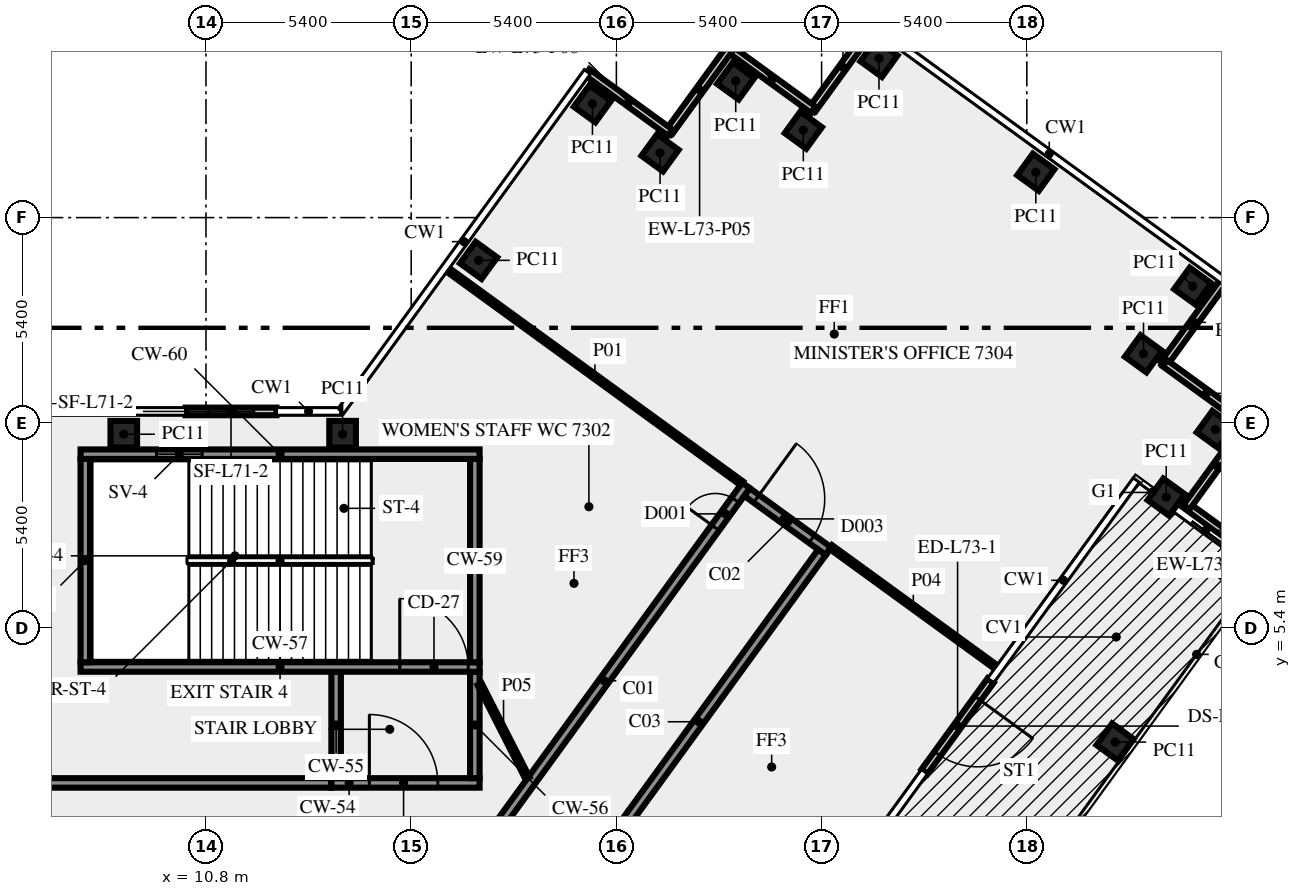
"""IFC4 building model, lengths in metres.
Left out: names, types, materials, properties, quantities, classifications, styles, units other than length and angle.
Written with IfcOpenShell. Run it as: python <this file> out.ifc"""

import sys

from ifc_helpers import new_model, si_unit, direction, frame, frame_2d, origin, origin_2d, place, context, subcontext, project, spatial, rectangle, extrude, element, fill, save


model = new_model("IFC4")
c1 = context("Model", 3, precision=1e-05, world=origin(), true_north=direction((0.0, 1.0)))
c2 = subcontext(c1, "Body", "Model", "MODEL_VIEW")
j1 = project(units=[si_unit("LENGTHUNIT", "METRE"), si_unit("PLANEANGLEUNIT", "RADIAN")], contexts=[c1])
p1 = place(None, origin())
s1 = spatial("IfcSite", under=j1, at=p1, CompositionType="ELEMENT")
p2 = place(p1, origin())
s2 = spatial("IfcBuilding", under=s1, at=p2, CompositionType="ELEMENT")
p3 = place(p2, frame((0.0, 0.0, 315.0)))
s3 = spatial("IfcBuildingStorey", under=s2, at=p3, CompositionType="ELEMENT", Elevation=315.0)
for number, where, z_axis, x_axis in (
    (1, (34.722, 2.4, 0.0), (0.0, 0.0, 1.0), (0.588, 0.809, 0.0)),
    (2, (37.96, 6.855, 0.0), (0.0, 0.0, 1.0), (0.588, 0.809, 0.0)),
    (3, (36.068, 8.844, 0.0), (0.0, 0.0, 1.0), (0.588, 0.809, 0.0)),
    (4, (37.36, 10.625, 0.0), (0.0, 0.0, 1.0), (0.588, 0.809, 0.0)),
    (5, (35.471, 12.616, 0.0), (0.0, 0.0, 1.0), (-0.809, 0.588, 0.0)),
    (6, (36.765, 14.395, 0.0), (0.0, 0.0, 1.0), (-0.809, 0.588, 0.0)),
    (7, (32.637, 17.393, 0.0), (0.0, 0.0, 1.0), (-0.809, 0.588, 0.0)),
    (8, (28.51, 20.39, 0.0), (0.0, 0.0, 1.0), (-0.588, -0.809, 0.0)),
    (9, (26.519, 18.5, 0.0), (0.0, 0.0, 1.0), (-0.809, 0.588, 0.0)),
    (10, (24.74, 19.795, 0.0), (0.0, 0.0, 1.0), (-0.588, -0.809, 0.0)),
    (11, (22.749, 17.904, 0.0), (0.0, 0.0, 1.0), (-0.588, -0.809, 0.0)),
    (12, (20.97, 19.195, 0.0), (0.0, 0.0, 1.0), (-0.588, -0.809, 0.0)),
    (13, (17.974, 15.075, 0.0), (0.0, 0.0, 1.0), (-0.588, -0.809, 0.0)),
    (14, (14.395, 10.5, 0.0), (0.0, 0.0, 1.0), (-1.0, 0.0, 0.0)),
    (15, (8.637, 10.5, 0.0), (0.0, 0.0, 1.0), (-1.0, 0.0, 0.0)),
):
    element("IfcColumn", number, at=place(p3, frame(where, z_axis=z_axis, x_axis=x_axis)), inside=s3, PredefinedType="COLUMN", context=c2, shape_type="SweptSolid", body=[
        extrude(rectangle(XDim=0.7, YDim=0.7, at=origin_2d()), origin(), (0.0, 0.0, 1.0), 3.65),
    ])
p4 = place(p3, frame((36.005, 12.352, 0.0), z_axis=(0.0, 0.0, 1.0), x_axis=(0.587762999008, 0.809033161865, 0.0)))
e16 = element("IfcWall", 16, at=p4, inside=s3, PredefinedType="SOLIDWALL", context=c2, shape_type="SweptSolid", body=[
    extrude(rectangle(XDim=2.7, YDim=0.2, at=frame_2d((1.35, 0.0))), origin(), (0.0, 0.0, 1.0), 3.65),
])
for number, where, z_axis, x_axis in (
    (17, (28.354, 21.247, 0.0), (0.0, 0.0, 1.0), (-0.588, -0.809, 0.0)),
    (18, (26.785, 19.036, 0.0), (0.0, 0.0, 1.0), (-0.809, 0.588, 0.0)),
):
    element("IfcWall", number, at=place(p3, frame(where, z_axis=z_axis, x_axis=x_axis)), inside=s3, PredefinedType="SOLIDWALL", context=c2, shape_type="SweptSolid", body=[
        extrude(rectangle(XDim=2.7, YDim=0.2, at=frame_2d((1.35, 0.0))), origin(), (0.0, 0.0, 1.0), 3.65),
    ])
for number, where, z_axis, x_axis in (
    (19, (24.583, 20.65, 0.0), (0.0, 0.0, 1.0), (-0.588, -0.809, 0.0)),
    (20, (23.013, 18.438, 0.0), (0.0, 0.0, 1.0), (-0.809, 0.588, 0.0)),
):
    element("IfcWall", number, at=place(p3, frame(where, z_axis=z_axis, x_axis=x_axis)), inside=s3, PredefinedType="SOLIDWALL", context=c2, shape_type="SweptSolid", body=[
        extrude(rectangle(XDim=2.7, YDim=0.2, at=frame_2d((1.35, 0.0))), origin(), (0.0, 0.0, 1.0), 3.65),
    ])
p5 = place(p3, frame((12.655, 11.1, 0.0), z_axis=(0.0, 0.0, 1.0), x_axis=(-1.0, 0.0, 0.0)))
e21 = element("IfcWall", 21, at=p5, inside=s3, PredefinedType="SOLIDWALL", context=c2, shape_type="SweptSolid", body=[
    extrude(rectangle(XDim=2.392, YDim=0.2, at=frame_2d((1.196, 0.0))), origin(), (0.0, 0.0, 1.0), 3.65),
])
p6 = place(p5, frame((0.596, 0.0, 1.0)))
e22 = element("IfcOpeningElement", 22, at=p6, cuts=e21, PredefinedType="OPENING", context=c2, shape_type="SweptSolid", body=[
    extrude(rectangle(XDim=1.2, YDim=1.2, at=frame_2d((0.6, 0.6))), frame((0.0, 0.11, 0.0), z_axis=(0.0, -1.0, 0.0), x_axis=(1.0, 0.0, 0.0)), (0.0, 0.0, 1.0), 0.22),
])
p7 = place(p3, frame((31.449, 4.019, 0.0), z_axis=(0.0, 0.0, 1.0), x_axis=(-0.58782869016, -0.808985433135, 0.0)))
e23 = element("IfcWall", 23, at=p7, inside=s3, PredefinedType="SOLIDWALL", context=c2, shape_type="SweptSolid", body=[
    extrude(rectangle(XDim=2.963, YDim=0.2, at=frame_2d((1.481, 0.0))), origin(), (0.0, 0.0, 1.0), 3.65),
])
p8 = place(p7, frame((0.582, 0.0, 0.0)))
e24 = element("IfcOpeningElement", 24, at=p8, cuts=e23, PredefinedType="OPENING", context=c2, shape_type="SweptSolid", body=[
    extrude(rectangle(XDim=1.8, YDim=2.4, at=frame_2d((0.9, 1.2))), frame((0.0, 0.11, 0.0), z_axis=(0.0, -1.0, 0.0), x_axis=(1.0, 0.0, 0.0)), (0.0, 0.0, 1.0), 0.22),
])
p9 = place(p3, frame((38.733, 7.069, 0.0), z_axis=(0.0, 0.0, 1.0), x_axis=(-0.80901210161, 0.587791986546, 0.0)))
e25 = element("IfcWall", 25, at=p9, inside=s3, PredefinedType="SOLIDWALL", context=c2, shape_type="SweptSolid", body=[
    extrude(rectangle(XDim=2.6, YDim=0.2, at=frame_2d((1.3, 0.0))), origin(), (0.0, 0.0, 1.0), 3.65),
])
for number, where, z_axis, x_axis in (
    (26, (36.602, 8.58, 0.0), (0.0, 0.0, 1.0), (0.588, 0.809, 0.0)),
    (27, (38.216, 10.782, 0.0), (0.0, 0.0, 1.0), (-0.809, 0.588, 0.0)),
):
    element("IfcWall", number, at=place(p3, frame(where, z_axis=z_axis, x_axis=x_axis)), inside=s3, PredefinedType="SOLIDWALL", context=c2, shape_type="SweptSolid", body=[
        extrude(rectangle(XDim=2.7, YDim=0.2, at=frame_2d((1.35, 0.0))), origin(), (0.0, 0.0, 1.0), 3.65),
    ])
p10 = place(p3, frame((14.1, 1.325, 0.0), z_axis=(0.0, 0.0, 1.0), x_axis=(1.0, 0.0, 0.0)))
e28 = element("IfcWall", 28, at=p10, inside=s3, PredefinedType="SHEAR", context=c2, shape_type="SweptSolid", body=[
    extrude(rectangle(XDim=3.9, YDim=0.25, at=frame_2d((1.95, 0.0))), origin(), (0.0, 0.0, 1.0), 3.65),
])
p11 = place(p10, frame((1.0, 0.0, 0.0)))
e29 = element("IfcOpeningElement", 29, at=p11, cuts=e28, PredefinedType="OPENING", context=c2, shape_type="SweptSolid", body=[
    extrude(rectangle(XDim=1.8, YDim=2.1, at=frame_2d((0.9, 1.05))), frame((0.0, 0.135, 0.0), z_axis=(0.0, -1.0, 0.0), x_axis=(1.0, 0.0, 0.0)), (0.0, 0.0, 1.0), 0.27),
])
for number, where, z_axis, x_axis in (
    (30, (14.225, 1.45, 0.0), (0.0, 0.0, 1.0), (0.0, 1.0, 0.0)),
    (31, (17.875, 1.45, 0.0), (0.0, 0.0, 1.0), (0.0, 1.0, 0.0)),
):
    element("IfcWall", number, at=place(p3, frame(where, z_axis=z_axis, x_axis=x_axis)), inside=s3, PredefinedType="SHEAR", context=c2, shape_type="SweptSolid", body=[
        extrude(rectangle(XDim=2.8, YDim=0.25, at=frame_2d((1.4, 0.0))), origin(), (0.0, 0.0, 1.0), 3.65),
    ])
p12 = place(p3, frame((7.5, 4.375, 0.0), z_axis=(0.0, 0.0, 1.0), x_axis=(1.0, 0.0, 0.0)))
e32 = element("IfcWall", 32, at=p12, inside=s3, PredefinedType="SHEAR", context=c2, shape_type="SweptSolid", body=[
    extrude(rectangle(XDim=10.5, YDim=0.25, at=frame_2d((5.25, 0.0))), origin(), (0.0, 0.0, 1.0), 3.65),
])
p13 = place(p12, frame((8.4, 0.0, 0.0)))
e33 = element("IfcOpeningElement", 33, at=p13, cuts=e32, PredefinedType="OPENING", context=c2, shape_type="SweptSolid", body=[
    extrude(rectangle(XDim=1.8, YDim=2.1, at=frame_2d((0.9, 1.05))), frame((0.0, 0.135, 0.0), z_axis=(0.0, -1.0, 0.0), x_axis=(1.0, 0.0, 0.0)), (0.0, 0.0, 1.0), 0.27),
])
for number, where, z_axis, x_axis in (
    (34, (7.625, 4.5, 0.0), (0.0, 0.0, 1.0), (0.0, 1.0, 0.0)),
    (35, (17.875, 4.5, 0.0), (0.0, 0.0, 1.0), (0.0, 1.0, 0.0)),
):
    element("IfcWall", number, at=place(p3, frame(where, z_axis=z_axis, x_axis=x_axis)), inside=s3, PredefinedType="SHEAR", context=c2, shape_type="SweptSolid", body=[
        extrude(rectangle(XDim=5.35, YDim=0.25, at=frame_2d((2.675, 0.0))), origin(), (0.0, 0.0, 1.0), 3.65),
    ])
p14 = place(p3, frame((7.5, 9.975, 0.0), z_axis=(0.0, 0.0, 1.0), x_axis=(1.0, 0.0, 0.0)))
e36 = element("IfcWall", 36, at=p14, inside=s3, PredefinedType="SHEAR", context=c2, shape_type="SweptSolid", body=[
    extrude(rectangle(XDim=10.5, YDim=0.25, at=frame_2d((5.25, 0.0))), origin(), (0.0, 0.0, 1.0), 3.65),
])
p15 = place(p14, frame((2.0, 0.0, 1.0)))
e37 = element("IfcOpeningElement", 37, at=p15, cuts=e36, PredefinedType="OPENING", context=c2, shape_type="SweptSolid", body=[
    extrude(rectangle(XDim=1.2, YDim=1.2, at=frame_2d((0.6, 0.6))), frame((0.0, 0.135, 0.0), z_axis=(0.0, -1.0, 0.0), x_axis=(1.0, 0.0, 0.0)), (0.0, 0.0, 1.0), 0.27),
])
p16 = place(p3, frame((17.545, -1.125, 0.0), z_axis=(0.0, 0.0, 1.0), x_axis=(0.587796810203, 0.809008596935, 0.0)))
e38 = element("IfcWall", 38, at=p16, inside=s3, PredefinedType="SOLIDWALL", context=c2, shape_type="SweptSolid", body=[
    extrude(rectangle(XDim=12.703, YDim=0.25, at=frame_2d((6.352, 0.0))), origin(), (0.0, 0.0, 1.0), 3.65),
])
p17 = place(p16, frame((11.329, 0.0, 0.0)))
e39 = element("IfcOpeningElement", 39, at=p17, cuts=e38, PredefinedType="OPENING", context=c2, shape_type="SweptSolid", body=[
    extrude(rectangle(XDim=0.9, YDim=2.1, at=frame_2d((0.45, 1.05))), frame((0.0, 0.135, 0.0), z_axis=(0.0, -1.0, 0.0), x_axis=(1.0, 0.0, 0.0)), (0.0, 0.0, 1.0), 0.27),
])
p18 = place(p3, frame((25.039, 8.978, 0.0), z_axis=(0.0, 0.0, 1.0), x_axis=(0.809006914995, -0.587799125119, 0.0)))
e40 = element("IfcWall", 40, at=p18, inside=s3, PredefinedType="SOLIDWALL", context=c2, shape_type="SweptSolid", body=[
    extrude(rectangle(XDim=2.65, YDim=0.25, at=frame_2d((1.325, 0.0))), origin(), (0.0, 0.0, 1.0), 3.65),
])
p19 = place(p18, frame((0.301, 0.0, 0.0)))
e41 = element("IfcOpeningElement", 41, at=p19, cuts=e40, PredefinedType="OPENING", context=c2, shape_type="SweptSolid", body=[
    extrude(rectangle(XDim=1.8, YDim=2.1, at=frame_2d((0.9, 1.05))), frame((0.0, 0.135, 0.0), z_axis=(0.0, -1.0, 0.0), x_axis=(1.0, 0.0, 0.0)), (0.0, 0.0, 1.0), 0.27),
])
p20 = place(p3, frame((27.009, 7.392, 0.0), z_axis=(0.0, 0.0, 1.0), x_axis=(-0.587776457057, -0.809023384414, 0.0)))
e42 = element("IfcWall", 42, at=p20, inside=s3, PredefinedType="SOLIDWALL", context=c2, shape_type="SweptSolid", body=[
    extrude(rectangle(XDim=11.021, YDim=0.25, at=frame_2d((5.51, 0.0))), origin(), (0.0, 0.0, 1.0), 3.65),
])
p21 = place(p20, frame((9.588, 0.0, 0.0)))
e43 = element("IfcOpeningElement", 43, at=p21, cuts=e42, PredefinedType="OPENING", context=c2, shape_type="SweptSolid", body=[
    extrude(rectangle(XDim=0.9, YDim=2.1, at=frame_2d((0.45, 1.05))), frame((0.0, 0.135, 0.0), z_axis=(0.0, -1.0, 0.0), x_axis=(1.0, 0.0, 0.0)), (0.0, 0.0, 1.0), 0.27),
])
p22 = place(p3, frame((-5.246, 1.325, 0.0), z_axis=(0.0, 0.0, 1.0), x_axis=(1.0, 0.0, 0.0)))
e44 = element("IfcWall", 44, at=p22, inside=s3, PredefinedType="SOLIDWALL", context=c2, shape_type="SweptSolid", body=[
    extrude(rectangle(XDim=19.336, YDim=0.25, at=frame_2d((9.668, 0.0))), origin(), (0.0, 0.0, 1.0), 3.65),
])
p23 = place(p22, frame((8.771, 0.0, 0.0)))
e45 = element("IfcOpeningElement", 45, at=p23, cuts=e44, PredefinedType="OPENING", context=c2, shape_type="SweptSolid", body=[
    extrude(rectangle(XDim=1.8, YDim=2.1, at=frame_2d((0.9, 1.05))), frame((0.0, 0.135, 0.0), z_axis=(0.0, -1.0, 0.0), x_axis=(1.0, 0.0, 0.0)), (0.0, 0.0, 1.0), 0.27),
])
p24 = place(p3, frame((24.898, 9.21, 0.0), z_axis=(0.0, 0.0, 1.0), x_axis=(-0.809034479891, 0.587761184791, 0.0)))
e46 = element("IfcWall", 46, at=p24, inside=s3, PredefinedType="PARTITIONING", context=c2, shape_type="SweptSolid", body=[
    extrude(rectangle(XDim=9.55, YDim=0.12, at=frame_2d((4.775, 0.0))), origin(), (0.0, 0.0, 1.0), 2.95),
])
p25 = place(p3, frame((27.241, 7.532, 0.0), z_axis=(0.0, 0.0, 1.0), x_axis=(0.809040727879, -0.587752584539, 0.0)))
e47 = element("IfcWall", 47, at=p25, inside=s3, PredefinedType="PARTITIONING", context=c2, shape_type="SweptSolid", body=[
    extrude(rectangle(XDim=5.37, YDim=0.12, at=frame_2d((2.685, 0.0))), origin(), (0.0, 0.0, 1.0), 3.65),
])
p26 = place(p3, frame((18.0, 3.925, 0.0), z_axis=(0.0, 0.0, 1.0), x_axis=(0.453950796792, -0.891026752736, 0.0)))
e48 = element("IfcWall", 48, at=p26, inside=s3, PredefinedType="PARTITIONING", context=c2, shape_type="SweptSolid", body=[
    extrude(rectangle(XDim=2.778, YDim=0.12, at=frame_2d((1.389, 0.0))), origin(), (0.0, 0.0, 1.0), 3.65),
])
p27 = place(p6, origin())
e49 = element("IfcWindow", 49, at=p27, inside=s3, PartitioningType="SINGLE_PANEL", PredefinedType="WINDOW", context=c2, shape_type="SweptSolid", body=[
    extrude(rectangle(XDim=1.2, YDim=1.2, at=frame_2d((0.6, 0.6))), frame((0.0, 0.03, 0.0), z_axis=(0.0, -1.0, 0.0), x_axis=(1.0, 0.0, 0.0)), (0.0, 0.0, 1.0), 0.06),
])
fill(e22, e49)
p28 = place(p8, origin())
e50 = element("IfcDoor", 50, at=p28, inside=s3, OperationType="DOUBLE_DOOR_SINGLE_SWING", PredefinedType="DOOR", context=c2, shape_type="SweptSolid", body=[
    extrude(rectangle(XDim=1.8, YDim=2.4, at=frame_2d((0.9, 1.2))), frame((0.0, 0.025, 0.0), z_axis=(0.0, -1.0, 0.0), x_axis=(1.0, 0.0, 0.0)), (0.0, 0.0, 1.0), 0.05),
])
fill(e24, e50)
p29 = place(p11, origin())
e51 = element("IfcDoor", 51, at=p29, inside=s3, OperationType="DOUBLE_DOOR_SINGLE_SWING", PredefinedType="DOOR", context=c2, shape_type="SweptSolid", body=[
    extrude(rectangle(XDim=1.8, YDim=2.1, at=frame_2d((0.9, 1.05))), frame((0.0, 0.025, 0.0), z_axis=(0.0, -1.0, 0.0), x_axis=(1.0, 0.0, 0.0)), (0.0, 0.0, 1.0), 0.05),
])
fill(e29, e51)
p30 = place(p13, origin())
e52 = element("IfcDoor", 52, at=p30, inside=s3, OperationType="DOUBLE_DOOR_SINGLE_SWING", PredefinedType="DOOR", context=c2, shape_type="SweptSolid", body=[
    extrude(rectangle(XDim=1.8, YDim=2.1, at=frame_2d((0.9, 1.05))), frame((0.0, 0.025, 0.0), z_axis=(0.0, -1.0, 0.0), x_axis=(1.0, 0.0, 0.0)), (0.0, 0.0, 1.0), 0.05),
])
fill(e33, e52)
p31 = place(p15, origin())
e53 = element("IfcWindow", 53, at=p31, inside=s3, PartitioningType="SINGLE_PANEL", PredefinedType="WINDOW", context=c2, shape_type="SweptSolid", body=[
    extrude(rectangle(XDim=1.2, YDim=1.2, at=frame_2d((0.6, 0.6))), frame((0.0, 0.03, 0.0), z_axis=(0.0, -1.0, 0.0), x_axis=(1.0, 0.0, 0.0)), (0.0, 0.0, 1.0), 0.06),
])
fill(e37, e53)
p32 = place(p17, origin())
e54 = element("IfcDoor", 54, at=p32, inside=s3, OperationType="SINGLE_SWING_RIGHT", PredefinedType="DOOR", context=c2, shape_type="SweptSolid", body=[
    extrude(rectangle(XDim=0.9, YDim=2.1, at=frame_2d((0.45, 1.05))), frame((0.0, 0.025, 0.0), z_axis=(0.0, -1.0, 0.0), x_axis=(1.0, 0.0, 0.0)), (0.0, 0.0, 1.0), 0.05),
])
fill(e39, e54)
p33 = place(p19, origin())
e55 = element("IfcDoor", 55, at=p33, inside=s3, OperationType="DOUBLE_DOOR_SINGLE_SWING", PredefinedType="DOOR", context=c2, shape_type="SweptSolid", body=[
    extrude(rectangle(XDim=1.8, YDim=2.1, at=frame_2d((0.9, 1.05))), frame((0.0, 0.025, 0.0), z_axis=(0.0, -1.0, 0.0), x_axis=(1.0, 0.0, 0.0)), (0.0, 0.0, 1.0), 0.05),
])
fill(e41, e55)
save(model, sys.argv[1])
